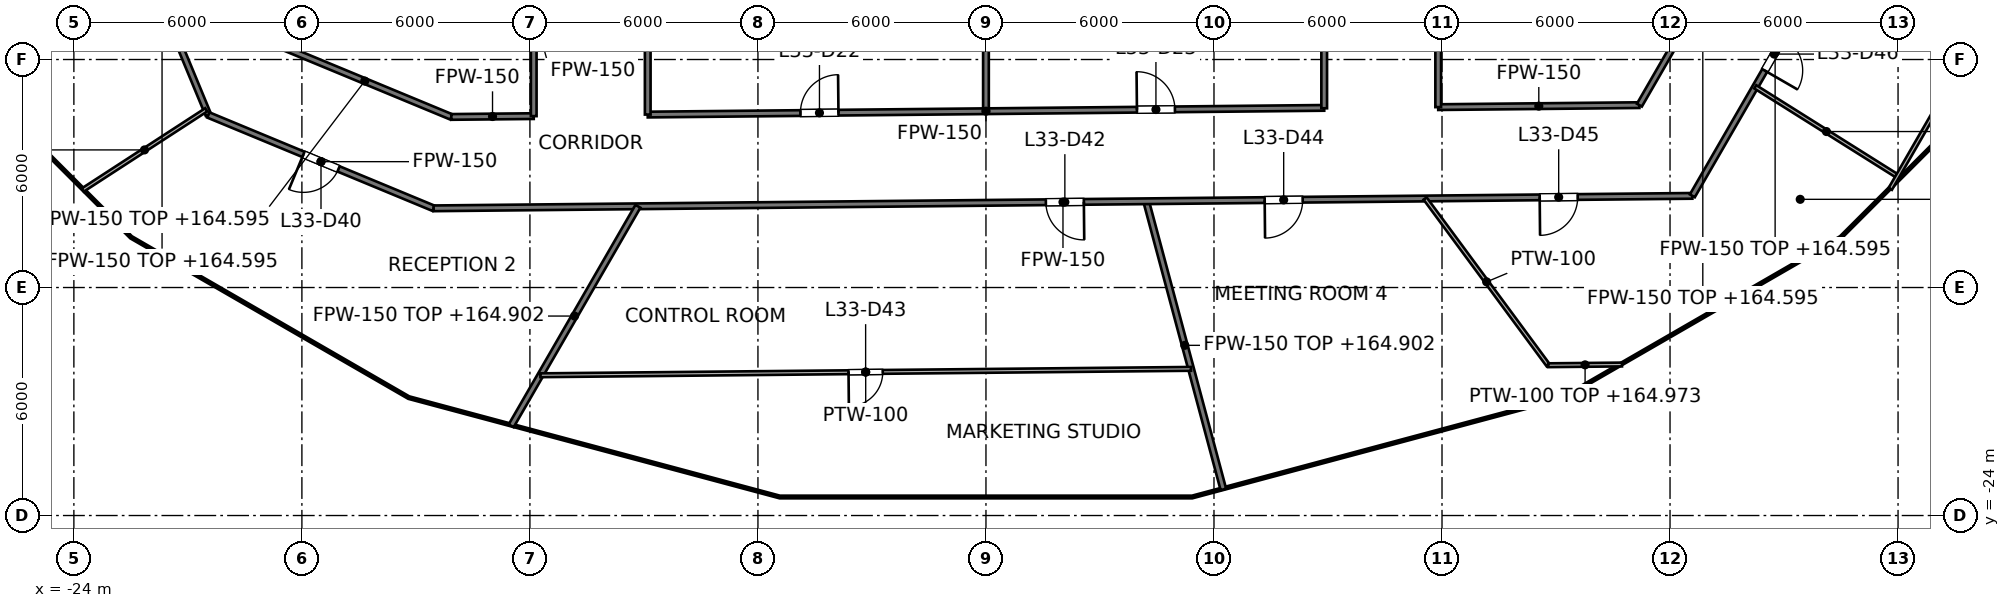
"""IFC4 building model, lengths in metres.
Left out: names, types, materials, properties, quantities, classifications, styles, units other than length and angle.
Written with IfcOpenShell. Run it as: python <this file> out.ifc"""

import sys

from ifc_helpers import new_model, si_unit, direction, frame, frame_2d, origin, place, context, subcontext, project, spatial, rectangle, extrude, element, fill, save


model = new_model("IFC4")
c1 = context("Model", 3, precision=1e-05, world=origin(), true_north=direction((0.0, 1.0)))
c2 = subcontext(c1, "Body", "Model", "MODEL_VIEW")
j1 = project(units=[si_unit("LENGTHUNIT", "METRE"), si_unit("PLANEANGLEUNIT", "RADIAN")], contexts=[c1])
p1 = place(None, origin())
s1 = spatial("IfcSite", under=j1, at=p1, CompositionType="ELEMENT")
p2 = place(p1, origin())
s2 = spatial("IfcBuilding", under=s1, at=p2, CompositionType="ELEMENT")
p3 = place(p2, frame((0.0, 0.0, 161.6)))
s3 = spatial("IfcBuildingStorey", under=s2, at=p3, CompositionType="ELEMENT", Elevation=161.6)
p4 = place(p3, frame((4.215, -15.73, 0.0), z_axis=(0.0, 0.0, 1.0), x_axis=(0.25883349714, -0.965921953762, 0.0)))
e1 = element("IfcWall", 1, at=p4, inside=s3, PredefinedType="PARTITIONING", context=c2, shape_type="SweptSolid", body=[
    extrude(rectangle(XDim=7.851, YDim=0.15, at=frame_2d((3.925, 0.0))), origin(), (0.0, 0.0, 1.0), 3.302),
])
p5 = place(p3, frame((-22.9, -7.572, 0.0), z_axis=(0.0, 0.0, 1.0), x_axis=(0.382860357704, -0.923806227788, 0.0)))
e2 = element("IfcWall", 2, at=p5, inside=s3, PredefinedType="PARTITIONING", context=c2, shape_type="SweptSolid", body=[
    extrude(rectangle(XDim=6.374, YDim=0.15, at=frame_2d((3.187, 0.0))), origin(), (0.0, 0.0, 1.0), 2.995),
])
p6 = place(p5, frame((2.638, 0.0, 0.0)))
e3 = element("IfcOpeningElement", 3, at=p6, cuts=e2, PredefinedType="OPENING", context=c2, shape_type="SweptSolid", body=[
    extrude(rectangle(XDim=1.0, YDim=2.1, at=frame_2d((0.5, 1.05))), frame((0.0, 0.075, 0.0), z_axis=(0.0, -1.0, 0.0), x_axis=(1.0, 0.0, 0.0)), (0.0, 0.0, 1.0), 0.15),
])
p7 = place(p3, frame((-20.46, -13.46, 0.0), z_axis=(0.0, 0.0, 1.0), x_axis=(0.923801547606, -0.382871650349, 0.0)))
e4 = element("IfcWall", 4, at=p7, inside=s3, PredefinedType="PARTITIONING", context=c2, shape_type="SweptSolid", body=[
    extrude(rectangle(XDim=6.415, YDim=0.15, at=frame_2d((3.208, 0.0))), origin(), (0.0, 0.0, 1.0), 2.927),
])
p8 = place(p7, frame((2.707, 0.0, 0.0)))
e5 = element("IfcOpeningElement", 5, at=p8, cuts=e4, PredefinedType="OPENING", context=c2, shape_type="SweptSolid", body=[
    extrude(rectangle(XDim=1.0, YDim=2.1, at=frame_2d((0.5, 1.05))), frame((0.0, 0.075, 0.0), z_axis=(0.0, -1.0, 0.0), x_axis=(1.0, 0.0, 0.0)), (0.0, 0.0, 1.0), 0.15),
])
p9 = place(p3, frame((-18.623, -11.623, 0.0), z_axis=(0.0, 0.0, 1.0), x_axis=(0.923791670587, -0.38289548098, 0.0)))
e6 = element("IfcWall", 6, at=p9, inside=s3, PredefinedType="PARTITIONING", context=c2, shape_type="SweptSolid", body=[
    extrude(rectangle(XDim=4.931, YDim=0.15, at=frame_2d((2.465, 0.0))), origin(), (0.0, 0.0, 1.0), 2.995),
])
p10 = place(p3, frame((-14.534, -15.916, 0.0), z_axis=(0.0, 0.0, 1.0), x_axis=(0.999950930262, 0.009906415532, 0.0)))
e7 = element("IfcWall", 7, at=p10, inside=s3, PredefinedType="PARTITIONING", context=c2, shape_type="SweptSolid", body=[
    extrude(rectangle(XDim=33.123, YDim=0.15, at=frame_2d((16.561, 0.0))), origin(), (0.0, 0.0, 1.0), 2.927),
])
p11 = place(p10, frame((16.111, 0.0, 0.0)))
e8 = element("IfcOpeningElement", 8, at=p11, cuts=e7, PredefinedType="OPENING", context=c2, shape_type="SweptSolid", body=[
    extrude(rectangle(XDim=1.0, YDim=2.1, at=frame_2d((0.5, 1.05))), frame((0.0, 0.075, 0.0), z_axis=(0.0, -1.0, 0.0), x_axis=(1.0, 0.0, 0.0)), (0.0, 0.0, 1.0), 0.15),
])
p12 = place(p10, frame((21.869, 0.0, 0.0)))
e9 = element("IfcOpeningElement", 9, at=p12, cuts=e7, PredefinedType="OPENING", context=c2, shape_type="SweptSolid", body=[
    extrude(rectangle(XDim=1.0, YDim=2.1, at=frame_2d((0.5, 1.05))), frame((0.0, 0.075, 0.0), z_axis=(0.0, -1.0, 0.0), x_axis=(1.0, 0.0, 0.0)), (0.0, 0.0, 1.0), 0.15),
])
p13 = place(p10, frame((29.106, 0.0, 0.0)))
e10 = element("IfcOpeningElement", 10, at=p13, cuts=e7, PredefinedType="OPENING", context=c2, shape_type="SweptSolid", body=[
    extrude(rectangle(XDim=1.0, YDim=2.1, at=frame_2d((0.5, 1.05))), frame((0.0, 0.075, 0.0), z_axis=(0.0, -1.0, 0.0), x_axis=(1.0, 0.0, 0.0)), (0.0, 0.0, 1.0), 0.15),
])
p14 = place(p3, frame((-14.068, -13.511, 0.0), z_axis=(0.0, 0.0, 1.0), x_axis=(0.999950911515, 0.009908307647, 0.0)))
e11 = element("IfcWall", 11, at=p14, inside=s3, PredefinedType="PARTITIONING", context=c2, shape_type="SweptSolid", body=[
    extrude(rectangle(XDim=2.168, YDim=0.15, at=frame_2d((1.084, 0.0))), origin(), (0.0, 0.0, 1.0), 2.927),
])
p15 = place(p3, frame((-8.9, -13.449, 0.0), z_axis=(0.0, 0.0, 1.0), x_axis=(0.999951105691, 0.009888691875, 0.0)))
e12 = element("IfcWall", 12, at=p15, inside=s3, PredefinedType="PARTITIONING", context=c2, shape_type="SweptSolid", body=[
    extrude(rectangle(XDim=17.801, YDim=0.15, at=frame_2d((8.9, 0.0))), origin(), (0.0, 0.0, 1.0), 2.927),
])
p16 = place(p15, frame((4.019, 0.0, 0.0)))
e13 = element("IfcOpeningElement", 13, at=p16, cuts=e12, PredefinedType="OPENING", context=c2, shape_type="SweptSolid", body=[
    extrude(rectangle(XDim=1.0, YDim=2.1, at=frame_2d((0.5, 1.05))), frame((0.0, 0.075, 0.0), z_axis=(0.0, -1.0, 0.0), x_axis=(1.0, 0.0, 0.0)), (0.0, 0.0, 1.0), 0.15),
])
p17 = place(p15, frame((12.873, 0.0, 0.0)))
e14 = element("IfcOpeningElement", 14, at=p17, cuts=e12, PredefinedType="OPENING", context=c2, shape_type="SweptSolid", body=[
    extrude(rectangle(XDim=1.0, YDim=2.1, at=frame_2d((0.5, 1.05))), frame((0.0, 0.075, 0.0), z_axis=(0.0, -1.0, 0.0), x_axis=(1.0, 0.0, 0.0)), (0.0, 0.0, 1.0), 0.15),
])
p18 = place(p3, frame((11.9, -13.253, 0.0), z_axis=(0.0, 0.0, 1.0), x_axis=(0.999951309192, 0.009868092237, 0.0)))
e15 = element("IfcWall", 15, at=p18, inside=s3, PredefinedType="PARTITIONING", context=c2, shape_type="SweptSolid", body=[
    extrude(rectangle(XDim=5.294, YDim=0.15, at=frame_2d((2.647, 0.0))), origin(), (0.0, 0.0, 1.0), 2.927),
])
p19 = place(p3, frame((18.587, -15.587, 0.0), z_axis=(0.0, 0.0, 1.0), x_axis=(0.500026433136, 0.866010142069, 0.0)))
e16 = element("IfcWall", 16, at=p19, inside=s3, PredefinedType="PARTITIONING", context=c2, shape_type="SweptSolid", body=[
    extrude(rectangle(XDim=8.713, YDim=0.15, at=frame_2d((4.357, 0.0))), origin(), (0.0, 0.0, 1.0), 2.995),
])
p20 = place(p19, frame((3.807, 0.0, 0.0)))
e17 = element("IfcOpeningElement", 17, at=p20, cuts=e16, PredefinedType="OPENING", context=c2, shape_type="SweptSolid", body=[
    extrude(rectangle(XDim=1.0, YDim=2.1, at=frame_2d((0.5, 1.05))), frame((0.0, 0.075, 0.0), z_axis=(0.0, -1.0, 0.0), x_axis=(1.0, 0.0, 0.0)), (0.0, 0.0, 1.0), 0.15),
])
p21 = place(p3, frame((17.194, -13.201, 0.0), z_axis=(0.0, 0.0, 1.0), x_axis=(0.499983182885, 0.866035112932, 0.0)))
e18 = element("IfcWall", 18, at=p21, inside=s3, PredefinedType="PARTITIONING", context=c2, shape_type="SweptSolid", body=[
    extrude(rectangle(XDim=6.674, YDim=0.15, at=frame_2d((3.337, 0.0))), origin(), (0.0, 0.0, 1.0), 2.995),
])
p22 = place(p21, frame((2.833, 0.0, 0.0)))
e19 = element("IfcOpeningElement", 19, at=p22, cuts=e18, PredefinedType="OPENING", context=c2, shape_type="SweptSolid", body=[
    extrude(rectangle(XDim=1.0, YDim=2.1, at=frame_2d((0.5, 1.05))), frame((0.0, 0.075, 0.0), z_axis=(0.0, -1.0, 0.0), x_axis=(1.0, 0.0, 0.0)), (0.0, 0.0, 1.0), 0.15),
])
p23 = place(p3, frame((-12.493, -21.639, 0.0), z_axis=(0.0, 0.0, 1.0), x_axis=(0.499985448992, 0.86603380465, 0.0)))
e20 = element("IfcWall", 20, at=p23, inside=s3, PredefinedType="PARTITIONING", context=c2, shape_type="SweptSolid", body=[
    extrude(rectangle(XDim=6.67, YDim=0.15, at=frame_2d((3.335, 0.0))), origin(), (0.0, 0.0, 1.0), 3.302),
])
p24 = place(p3, frame((11.9, -13.253, 0.0), z_axis=(0.0, 0.0, 1.0), x_axis=(0.0, 1.0, 0.0)))
e21 = element("IfcWall", 21, at=p24, inside=s3, PredefinedType="PARTITIONING", context=c2, shape_type="SweptSolid", body=[
    extrude(rectangle(XDim=5.253, YDim=0.15, at=frame_2d((2.626, 0.0))), origin(), (0.0, 0.0, 1.0), 2.927),
])
p25 = place(p3, frame((8.9, -13.283, 0.0), z_axis=(0.0, 0.0, 1.0), x_axis=(0.0, 1.0, 0.0)))
e22 = element("IfcWall", 22, at=p25, inside=s3, PredefinedType="PARTITIONING", context=c2, shape_type="SweptSolid", body=[
    extrude(rectangle(XDim=5.283, YDim=0.15, at=frame_2d((2.642, 0.0))), origin(), (0.0, 0.0, 1.0), 2.927),
])
p26 = place(p3, frame((0.0, -13.361, 0.0), z_axis=(0.0, 0.0, 1.0), x_axis=(0.0, 1.0, 0.0)))
e23 = element("IfcWall", 23, at=p26, inside=s3, PredefinedType="PARTITIONING", context=c2, shape_type="SweptSolid", body=[
    extrude(rectangle(XDim=5.361, YDim=0.15, at=frame_2d((2.681, 0.0))), origin(), (0.0, 0.0, 1.0), 2.927),
])
p27 = place(p3, frame((-8.9, -13.449, 0.0), z_axis=(0.0, 0.0, 1.0), x_axis=(0.0, 1.0, 0.0)))
e24 = element("IfcWall", 24, at=p27, inside=s3, PredefinedType="PARTITIONING", context=c2, shape_type="SweptSolid", body=[
    extrude(rectangle(XDim=5.449, YDim=0.15, at=frame_2d((2.725, 0.0))), origin(), (0.0, 0.0, 1.0), 2.927),
])
p28 = place(p3, frame((-11.9, -13.49, 0.0), z_axis=(0.0, 0.0, 1.0), x_axis=(0.0, 1.0, 0.0)))
e25 = element("IfcWall", 25, at=p28, inside=s3, PredefinedType="PARTITIONING", context=c2, shape_type="SweptSolid", body=[
    extrude(rectangle(XDim=5.49, YDim=0.15, at=frame_2d((2.745, 0.0))), origin(), (0.0, 0.0, 1.0), 2.927),
])
p29 = place(p28, frame((2.245, 0.0, 0.0)))
e26 = element("IfcOpeningElement", 26, at=p29, cuts=e25, PredefinedType="OPENING", context=c2, shape_type="SweptSolid", body=[
    extrude(rectangle(XDim=1.0, YDim=2.1, at=frame_2d((0.5, 1.05))), frame((0.0, 0.075, 0.0), z_axis=(0.0, -1.0, 0.0), x_axis=(1.0, 0.0, 0.0)), (0.0, 0.0, 1.0), 0.15),
])
p30 = place(p3, frame((11.555, -15.657, 0.0), z_axis=(0.0, 0.0, 1.0), x_axis=(0.593887483444, -0.80454810733, 0.0)))
e27 = element("IfcWall", 27, at=p30, inside=s3, PredefinedType="PARTITIONING", context=c2, shape_type="SweptSolid", body=[
    extrude(rectangle(XDim=5.454, YDim=0.1, at=frame_2d((2.727, 0.0))), origin(), (0.0, 0.0, 1.0), 2.927),
])
p31 = place(p3, frame((20.243, -12.719, 0.0), z_axis=(0.0, 0.0, 1.0), x_axis=(0.846680609893, -0.532101442237, 0.0)))
e28 = element("IfcWall", 28, at=p31, inside=s3, PredefinedType="PARTITIONING", context=c2, shape_type="SweptSolid", body=[
    extrude(rectangle(XDim=4.422, YDim=0.1, at=frame_2d((2.211, 0.0))), origin(), (0.0, 0.0, 1.0), 3.475),
])
p32 = place(p3, frame((-11.725, -20.309, 0.0), z_axis=(0.0, 0.0, 1.0), x_axis=(0.999951599065, 0.009838675042, 0.0)))
e29 = element("IfcWall", 29, at=p32, inside=s3, PredefinedType="PARTITIONING", context=c2, shape_type="SweptSolid", body=[
    extrude(rectangle(XDim=17.122, YDim=0.1, at=frame_2d((8.561, 0.0))), origin(), (0.0, 0.0, 1.0), 2.927),
])
p33 = place(p32, frame((8.109, 0.0, 0.0)))
e30 = element("IfcOpeningElement", 30, at=p33, cuts=e29, PredefinedType="OPENING", context=c2, shape_type="SweptSolid", body=[
    extrude(rectangle(XDim=0.9, YDim=2.1, at=frame_2d((0.45, 1.05))), frame((0.0, 0.05, 0.0), z_axis=(0.0, -1.0, 0.0), x_axis=(1.0, 0.0, 0.0)), (0.0, 0.0, 1.0), 0.1),
])
p34 = place(p3, frame((14.794, -20.045, 0.0), z_axis=(0.0, 0.0, 1.0), x_axis=(0.999951932943, 0.009804682686, 0.0)))
e31 = element("IfcWall", 31, at=p34, inside=s3, PredefinedType="PARTITIONING", context=c2, shape_type="SweptSolid", body=[
    extrude(rectangle(XDim=1.942, YDim=0.1, at=frame_2d((0.971, 0.0))), origin(), (0.0, 0.0, 1.0), 3.373),
])
p35 = place(p3, frame((-23.766, -15.434, 0.0), z_axis=(0.0, 0.0, 1.0), x_axis=(0.838650885555, 0.544669342039, 0.0)))
e32 = element("IfcWall", 32, at=p35, inside=s3, PredefinedType="PARTITIONING", context=c2, shape_type="SweptSolid", body=[
    extrude(rectangle(XDim=3.874, YDim=0.1, at=frame_2d((1.937, 0.0))), origin(), (0.0, 0.0, 1.0), 3.475),
])
p36 = place(p3, frame((23.795, -15.405, 0.0), z_axis=(0.0, 0.0, 1.0), x_axis=(0.50004207551, 0.866001110115, 0.0)))
e33 = element("IfcWall", 33, at=p36, inside=s3, PredefinedType="PARTITIONING", context=c2, shape_type="SweptSolid", body=[
    extrude(rectangle(XDim=7.185, YDim=0.1, at=frame_2d((3.593, 0.0))), origin(), (0.0, 0.0, 1.0), 2.995),
])
p37 = place(p16, origin())
e34 = element("IfcDoor", 34, at=p37, inside=s3, OperationType="SINGLE_SWING_RIGHT", PredefinedType="DOOR", context=c2, shape_type="SweptSolid", body=[
    extrude(rectangle(XDim=1.0, YDim=2.1, at=frame_2d((0.5, 1.05))), frame((0.0, 0.025, 0.0), z_axis=(0.0, -1.0, 0.0), x_axis=(1.0, 0.0, 0.0)), (0.0, 0.0, 1.0), 0.05),
])
fill(e13, e34)
p38 = place(p17, origin())
e35 = element("IfcDoor", 35, at=p38, inside=s3, OperationType="SINGLE_SWING_LEFT", PredefinedType="DOOR", context=c2, shape_type="SweptSolid", body=[
    extrude(rectangle(XDim=1.0, YDim=2.1, at=frame_2d((0.5, 1.05))), frame((0.0, 0.025, 0.0), z_axis=(0.0, -1.0, 0.0), x_axis=(1.0, 0.0, 0.0)), (0.0, 0.0, 1.0), 0.05),
])
fill(e14, e35)
p39 = place(p8, origin())
e36 = element("IfcDoor", 36, at=p39, inside=s3, OperationType="SINGLE_SWING_LEFT", PredefinedType="DOOR", context=c2, shape_type="SweptSolid", body=[
    extrude(rectangle(XDim=1.0, YDim=2.1, at=frame_2d((0.5, 1.05))), frame((0.0, 0.025, 0.0), z_axis=(0.0, -1.0, 0.0), x_axis=(1.0, 0.0, 0.0)), (0.0, 0.0, 1.0), 0.05),
])
fill(e5, e36)
p40 = place(p11, origin())
e37 = element("IfcDoor", 37, at=p40, inside=s3, OperationType="SINGLE_SWING_RIGHT", PredefinedType="DOOR", context=c2, shape_type="SweptSolid", body=[
    extrude(rectangle(XDim=1.0, YDim=2.1, at=frame_2d((0.5, 1.05))), frame((0.0, 0.025, 0.0), z_axis=(0.0, -1.0, 0.0), x_axis=(1.0, 0.0, 0.0)), (0.0, 0.0, 1.0), 0.05),
])
fill(e8, e37)
p41 = place(p33, origin())
e38 = element("IfcDoor", 38, at=p41, inside=s3, OperationType="SINGLE_SWING_LEFT", PredefinedType="DOOR", context=c2, shape_type="SweptSolid", body=[
    extrude(rectangle(XDim=0.9, YDim=2.1, at=frame_2d((0.45, 1.05))), frame((0.0, 0.025, 0.0), z_axis=(0.0, -1.0, 0.0), x_axis=(1.0, 0.0, 0.0)), (0.0, 0.0, 1.0), 0.05),
])
fill(e30, e38)
p42 = place(p12, origin())
e39 = element("IfcDoor", 39, at=p42, inside=s3, OperationType="SINGLE_SWING_LEFT", PredefinedType="DOOR", context=c2, shape_type="SweptSolid", body=[
    extrude(rectangle(XDim=1.0, YDim=2.1, at=frame_2d((0.5, 1.05))), frame((0.0, 0.025, 0.0), z_axis=(0.0, -1.0, 0.0), x_axis=(1.0, 0.0, 0.0)), (0.0, 0.0, 1.0), 0.05),
])
fill(e9, e39)
p43 = place(p13, origin())
e40 = element("IfcDoor", 40, at=p43, inside=s3, OperationType="SINGLE_SWING_LEFT", PredefinedType="DOOR", context=c2, shape_type="SweptSolid", body=[
    extrude(rectangle(XDim=1.0, YDim=2.1, at=frame_2d((0.5, 1.05))), frame((0.0, 0.025, 0.0), z_axis=(0.0, -1.0, 0.0), x_axis=(1.0, 0.0, 0.0)), (0.0, 0.0, 1.0), 0.05),
])
fill(e10, e40)
p44 = place(p20, origin())
e41 = element("IfcDoor", 41, at=p44, inside=s3, OperationType="SINGLE_SWING_LEFT", PredefinedType="DOOR", context=c2, shape_type="SweptSolid", body=[
    extrude(rectangle(XDim=1.0, YDim=2.1, at=frame_2d((0.5, 1.05))), frame((0.0, 0.025, 0.0), z_axis=(0.0, -1.0, 0.0), x_axis=(1.0, 0.0, 0.0)), (0.0, 0.0, 1.0), 0.05),
])
fill(e17, e41)
save(model, sys.argv[1])
